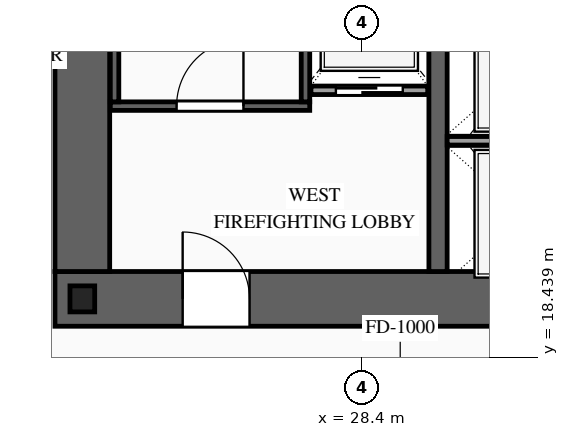
"""IFC4 building model, lengths in metres.
Left out: names, types, materials, properties, quantities, classifications, styles, units other than length and angle.
Written with IfcOpenShell. Run it as: python <this file> out.ifc"""

import sys

from ifc_helpers import new_model, si_unit, direction, frame, frame_2d, origin, origin_2d, place, context, subcontext, project, spatial, rectangle, i_section, extrude, source, transform, mapped, element, fill, save


model = new_model("IFC4")
c1 = context("Model", 3, precision=1e-05, world=origin(), true_north=direction((0.0, 1.0)))
c2 = subcontext(c1, "Body", "Model", "MODEL_VIEW")
j1 = project(units=[si_unit("LENGTHUNIT", "METRE"), si_unit("PLANEANGLEUNIT", "RADIAN")], contexts=[c1])
p1 = place(None, origin())
s1 = spatial("IfcSite", under=j1, at=p1, CompositionType="ELEMENT")
p2 = place(p1, origin())
s2 = spatial("IfcBuilding", under=s1, at=p2, CompositionType="ELEMENT")
p3 = place(p2, frame((0.0, 0.0, 78.4)))
s3 = spatial("IfcBuildingStorey", under=s2, at=p3, CompositionType="ELEMENT", Elevation=78.4)
p4 = place(p3, frame((23.35, 19.4, 0.0), z_axis=(0.0, 0.0, 1.0), x_axis=(1.0, 0.0, 0.0)))
e1 = element("IfcWall", 1, at=p4, inside=s3, PredefinedType="SHEAR", context=c2, shape_type="SweptSolid", body=[
    extrude(rectangle(XDim=27.3, YDim=0.9, at=frame_2d((13.65, 0.0))), origin(), (0.0, 0.0, 1.0), 3.6),
])
p5 = place(p4, frame((2.1, 0.0, 0.0)))
e2 = element("IfcOpeningElement", 2, at=p5, cuts=e1, PredefinedType="OPENING", context=c2, shape_type="SweptSolid", body=[
    extrude(rectangle(XDim=1.1, YDim=2.2, at=frame_2d((0.55, 1.1))), frame((0.0, 0.465, 0.0), z_axis=(0.0, -1.0, 0.0), x_axis=(1.0, 0.0, 0.0)), (0.0, 0.0, 1.0), 0.93),
])
p6 = place(p4, frame((10.0, 0.0, 0.0)))
e3 = element("IfcOpeningElement", 3, at=p6, cuts=e1, PredefinedType="OPENING", context=c2, shape_type="SweptSolid", body=[
    extrude(rectangle(XDim=1.1, YDim=2.2, at=frame_2d((0.55, 1.1))), frame((0.0, 0.465, 0.0), z_axis=(0.0, -1.0, 0.0), x_axis=(1.0, 0.0, 0.0)), (0.0, 0.0, 1.0), 0.93),
])
p7 = place(p4, frame((23.2, 0.0, 0.0)))
e4 = element("IfcOpeningElement", 4, at=p7, cuts=e1, PredefinedType="OPENING", context=c2, shape_type="SweptSolid", body=[
    extrude(rectangle(XDim=1.1, YDim=2.2, at=frame_2d((0.55, 1.1))), frame((0.0, 0.465, 0.0), z_axis=(0.0, -1.0, 0.0), x_axis=(1.0, 0.0, 0.0)), (0.0, 0.0, 1.0), 0.93),
])
p8 = place(p4, frame((19.82, 0.0, 0.0)))
e5 = element("IfcOpeningElement", 5, at=p8, cuts=e1, PredefinedType="OPENING", context=c2, shape_type="SweptSolid", body=[
    extrude(rectangle(XDim=0.9, YDim=2.15, at=frame_2d((0.45, 1.075))), frame((0.0, 0.465, 0.0), z_axis=(0.0, -1.0, 0.0), x_axis=(1.0, 0.0, 0.0)), (0.0, 0.0, 1.0), 0.93),
])
p9 = place(p4, frame((18.38, 0.0, 0.0)))
e6 = element("IfcOpeningElement", 6, at=p9, cuts=e1, PredefinedType="OPENING", context=c2, shape_type="SweptSolid", body=[
    extrude(rectangle(XDim=0.9, YDim=2.15, at=frame_2d((0.45, 1.075))), frame((0.0, 0.465, 0.0), z_axis=(0.0, -1.0, 0.0), x_axis=(1.0, 0.0, 0.0)), (0.0, 0.0, 1.0), 0.93),
])
m1 = source(origin(), c2, "Body", "SweptSolid", [
    extrude(rectangle(XDim=11.9, YDim=0.9, at=frame_2d((5.95, 0.0))), origin(), (0.0, 0.0, 1.0), 3.6),
])
p10 = place(p3, frame((23.8, 19.85, 0.0), z_axis=(0.0, 0.0, 1.0), x_axis=(0.0, 1.0, 0.0)))
e7 = element("IfcWall", 7, at=p10, inside=s3, PredefinedType="SHEAR", context=c2, shape_type="MappedRepresentation", body=[
    mapped(m1, transform((0.0, 0.0, 0.0), scale=1.0)),
])
m2 = source(origin(), c2, "Body", "SweptSolid", [
    extrude(rectangle(XDim=11.9, YDim=0.3, at=frame_2d((5.95, 0.0))), origin(), (0.0, 0.0, 1.0), 3.6),
])
p11 = place(p3, frame((29.65, 19.85, 0.0), z_axis=(0.0, 0.0, 1.0), x_axis=(0.0, 1.0, 0.0)))
e8 = element("IfcWall", 8, at=p11, inside=s3, PredefinedType="SOLIDWALL", context=c2, shape_type="MappedRepresentation", body=[
    mapped(m2, transform((0.0, 0.0, 0.0), scale=1.0)),
])
m3 = source(origin(), c2, "Body", "SweptSolid", [
    extrude(i_section(OverallWidth=0.407, OverallDepth=0.428, WebThickness=0.02, FlangeThickness=0.035, at=origin_2d()), origin(), (0.0, 0.0, 1.0), 3.6),
])
p12 = place(p3, frame((23.8, 19.4, 0.0), z_axis=(0.0, 0.0, 1.0), x_axis=(1.0, 0.0, 0.0)))
e9 = element("IfcColumn", 9, at=p12, inside=s3, PredefinedType="COLUMN", context=c2, shape_type="MappedRepresentation", body=[
    mapped(m3, transform((0.0, 0.0, 0.0), scale=1.0)),
])
p13 = place(p3, frame((27.56, 22.83, 0.0), z_axis=(0.0, 0.0, 1.0), x_axis=(1.0, 0.0, 0.0)))
e10 = element("IfcWall", 10, at=p13, inside=s3, PredefinedType="SOLIDWALL", context=c2, shape_type="SweptSolid", body=[
    extrude(rectangle(XDim=1.92, YDim=0.14, at=frame_2d((0.96, 0.0))), origin(), (0.0, 0.0, 1.0), 3.38),
])
p14 = place(p13, frame((0.41, 0.0, 0.0)))
e11 = element("IfcOpeningElement", 11, at=p14, cuts=e10, PredefinedType="OPENING", context=c2, shape_type="SweptSolid", body=[
    extrude(rectangle(XDim=1.1, YDim=2.2, at=frame_2d((0.55, 1.1))), frame((0.0, 0.085, 0.0), z_axis=(0.0, -1.0, 0.0), x_axis=(1.0, 0.0, 0.0)), (0.0, 0.0, 1.0), 0.17),
])
m4 = source(origin(), c2, "Body", "SweptSolid", [
    extrude(rectangle(XDim=2.5, YDim=0.14, at=frame_2d((1.25, 0.0))), origin(), (0.0, 0.0, 1.0), 3.38),
])
p15 = place(p3, frame((29.8, 22.0, 0.0), z_axis=(0.0, 0.0, 1.0), x_axis=(1.0, 0.0, 0.0)))
e12 = element("IfcWall", 12, at=p15, inside=s3, PredefinedType="SOLIDWALL", context=c2, shape_type="MappedRepresentation", body=[
    mapped(m4, transform((0.0, 0.0, 0.0), scale=1.0)),
])
p16 = place(p3, frame((24.26, 22.57, 0.0), z_axis=(0.0, 0.0, 1.0), x_axis=(1.0, 0.0, 0.0)))
e13 = element("IfcWall", 13, at=p16, inside=s3, PredefinedType="SOLIDWALL", context=c2, shape_type="SweptSolid", body=[
    extrude(rectangle(XDim=3.28, YDim=0.14, at=frame_2d((1.64, 0.0))), origin(), (0.0, 0.0, 1.0), 3.38),
])
p17 = place(p16, frame((1.09, 0.0, 0.0)))
e14 = element("IfcOpeningElement", 14, at=p17, cuts=e13, PredefinedType="OPENING", context=c2, shape_type="SweptSolid", body=[
    extrude(rectangle(XDim=1.1, YDim=2.2, at=frame_2d((0.55, 1.1))), frame((0.0, 0.085, 0.0), z_axis=(0.0, -1.0, 0.0), x_axis=(1.0, 0.0, 0.0)), (0.0, 0.0, 1.0), 0.17),
])
m5 = source(origin(), c2, "Body", "SweptSolid", [
    extrude(rectangle(XDim=8.94, YDim=0.14, at=frame_2d((4.47, 0.0))), origin(), (0.0, 0.0, 1.0), 3.38),
])
for number, where, z_axis, x_axis in (
    (15, (24.33, 22.64, 0.0), (0.0, 0.0, 1.0), (0.0, 1.0, 0.0)),
    (16, (27.47, 22.64, 0.0), (0.0, 0.0, 1.0), (0.0, 1.0, 0.0)),
):
    element("IfcWall", number, at=place(p3, frame(where, z_axis=z_axis, x_axis=x_axis)), inside=s3, PredefinedType="SOLIDWALL", context=c2, shape_type="MappedRepresentation", body=[
        mapped(m5, transform((0.0, 0.0, 0.0), scale=1.0)),
    ])
m6 = source(origin(), c2, "Body", "SweptSolid", [
    extrude(rectangle(XDim=1.1, YDim=2.2, at=frame_2d((0.55, 1.1))), frame((0.0, 0.025, 0.0), z_axis=(0.0, -1.0, 0.0), x_axis=(1.0, 0.0, 0.0)), (0.0, 0.0, 1.0), 0.05),
])
p18 = place(p14, origin())
e17 = element("IfcDoor", 17, at=p18, inside=s3, OperationType="SLIDING_TO_LEFT", PredefinedType="DOOR", context=c2, shape_type="MappedRepresentation", body=[
    mapped(m6, transform((0.0, 0.0, 0.0), scale=1.0)),
])
fill(e11, e17)
m7 = source(origin(), c2, "Body", "SweptSolid", [
    extrude(rectangle(XDim=1.1, YDim=2.2, at=frame_2d((0.55, 1.1))), frame((0.0, 0.025, 0.0), z_axis=(0.0, -1.0, 0.0), x_axis=(1.0, 0.0, 0.0)), (0.0, 0.0, 1.0), 0.05),
])
p19 = place(p17, origin())
e18 = element("IfcDoor", 18, at=p19, inside=s3, OperationType="SINGLE_SWING_RIGHT", PredefinedType="DOOR", context=c2, shape_type="MappedRepresentation", body=[
    mapped(m7, transform((0.0, 0.0, 0.0), scale=1.0)),
])
fill(e14, e18)
p20 = place(p5, origin())
e19 = element("IfcDoor", 19, at=p20, inside=s3, OperationType="SINGLE_SWING_LEFT", PredefinedType="DOOR", context=c2, shape_type="MappedRepresentation", body=[
    mapped(m7, transform((0.0, 0.0, 0.0), scale=1.0)),
])
fill(e2, e19)
save(model, sys.argv[1])
